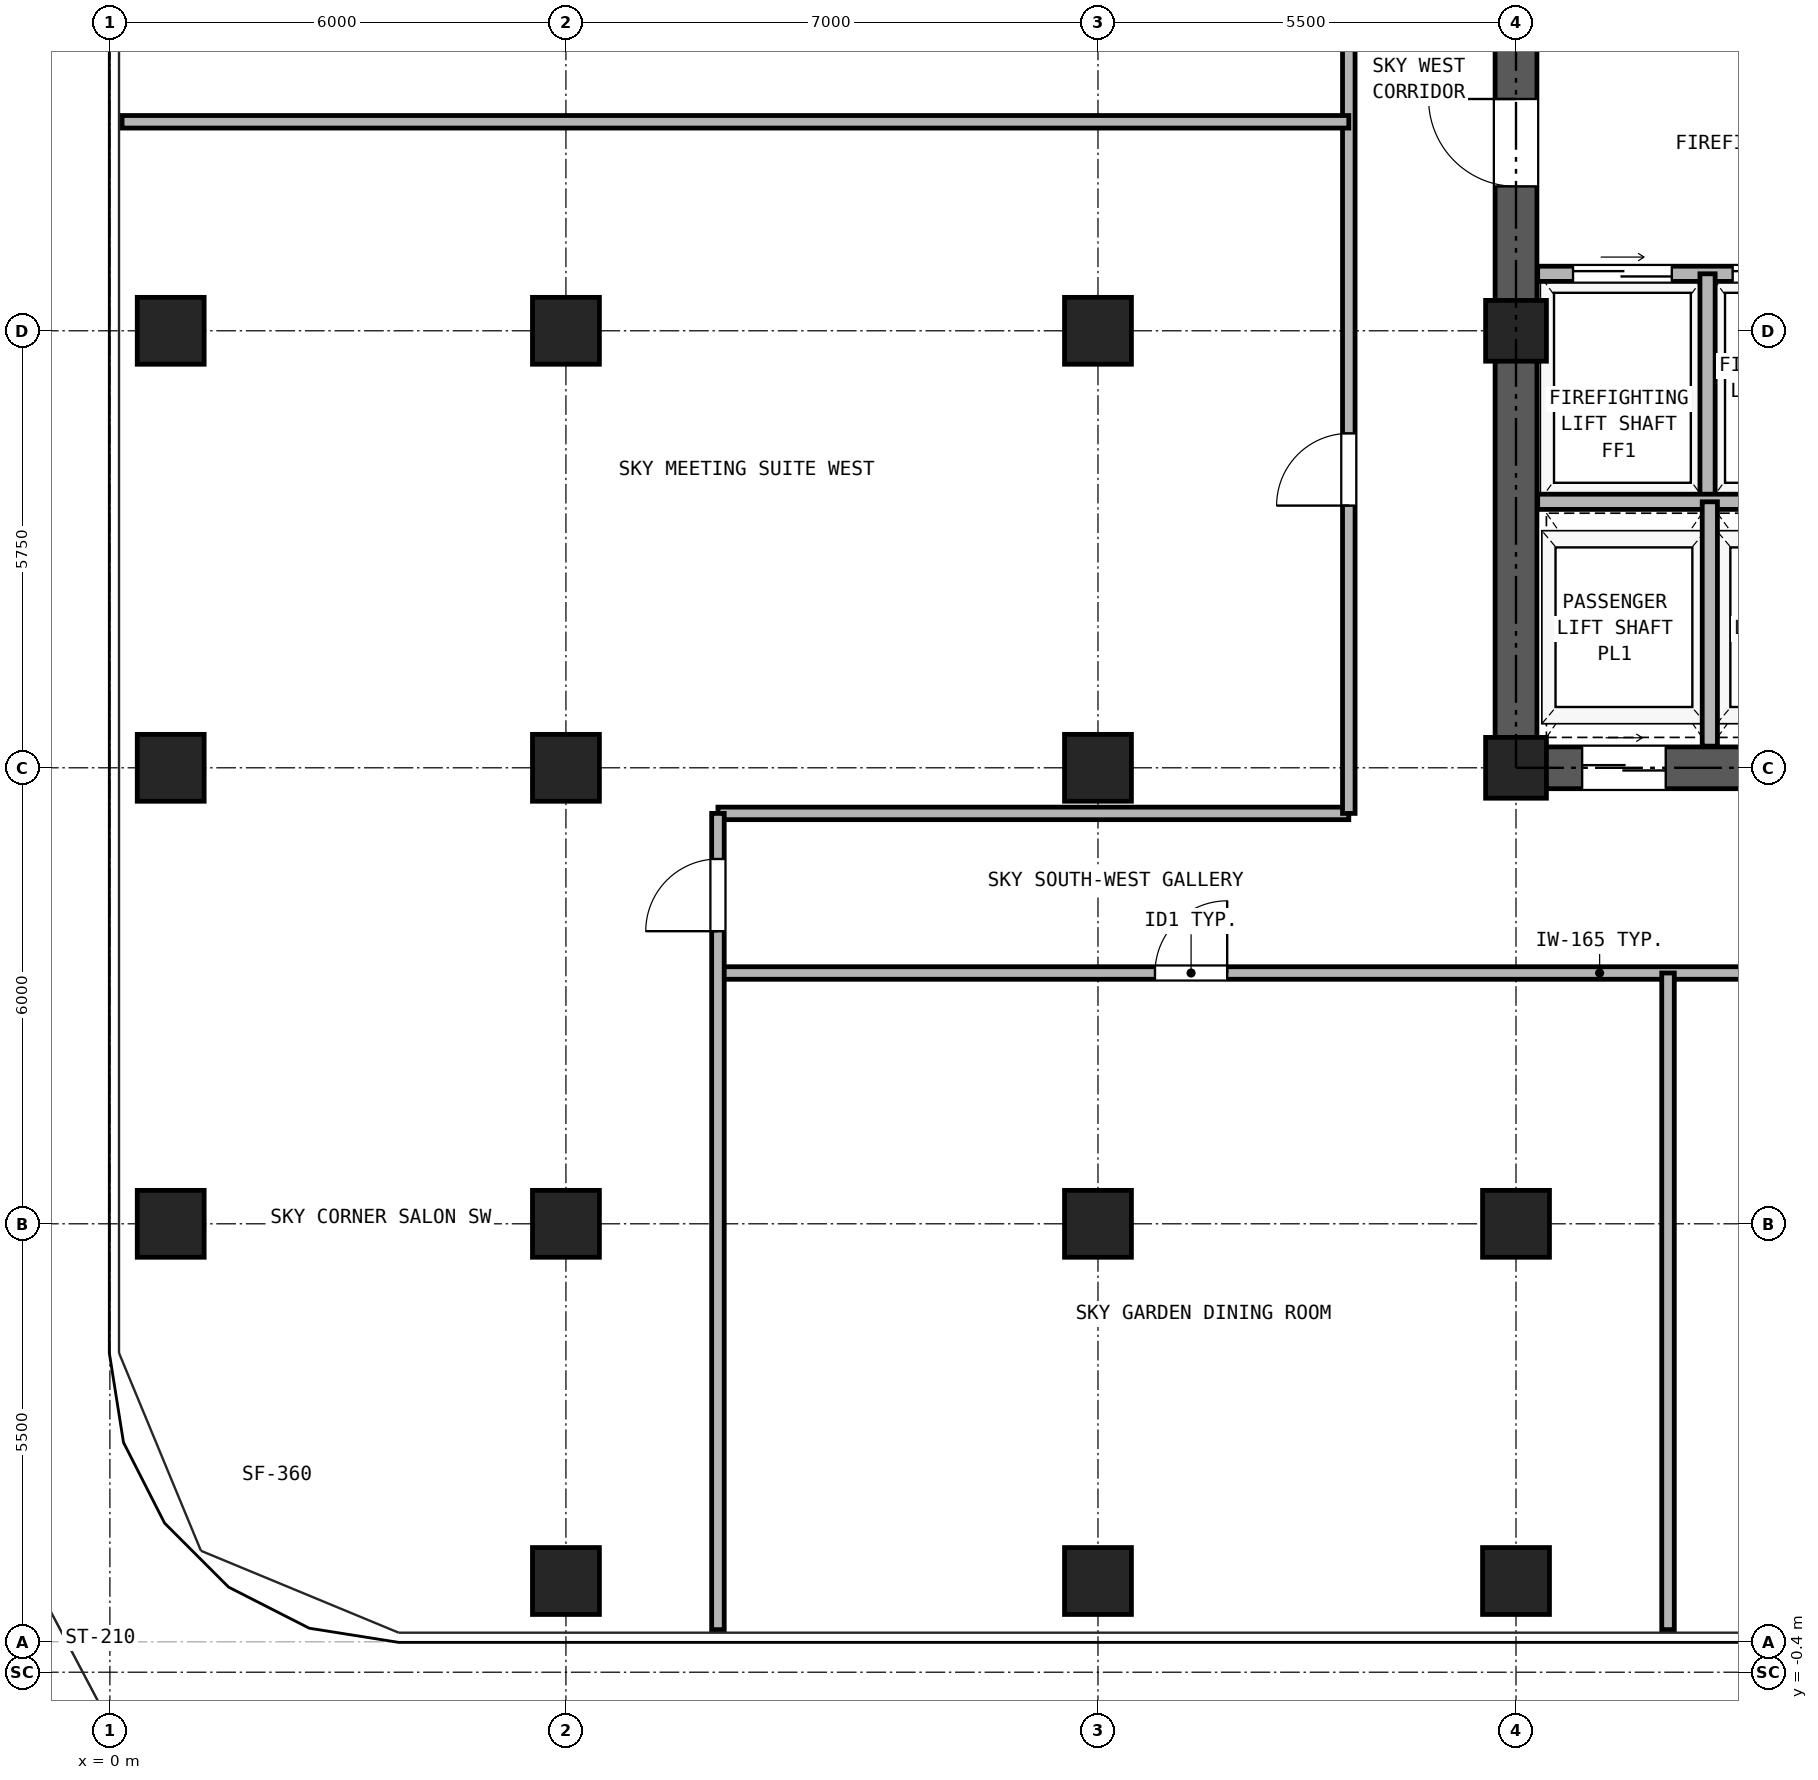
"""IFC4 building model, lengths in metres.
Left out: names, types, materials, properties, quantities, classifications, styles, units other than length and angle.
Written with IfcOpenShell. Run it as: python <this file> out.ifc"""

import sys

from ifc_helpers import new_model, si_unit, direction, frame, frame_2d, origin, origin_2d, place, context, subcontext, project, spatial, rectangle, hollow_rectangle, extrude, source, transform, mapped, element, fill, save


model = new_model("IFC4")
c1 = context("Model", 3, precision=1e-05, world=origin(), true_north=direction((0.0, 1.0)))
c2 = subcontext(c1, "Body", "Model", "MODEL_VIEW")
j1 = project(units=[si_unit("LENGTHUNIT", "METRE"), si_unit("PLANEANGLEUNIT", "RADIAN")], contexts=[c1])
p1 = place(None, origin())
s1 = spatial("IfcSite", under=j1, at=p1, CompositionType="ELEMENT")
p2 = place(p1, origin())
s2 = spatial("IfcBuilding", under=s1, at=p2, CompositionType="ELEMENT")
p3 = place(p2, frame((0.0, 0.0, 88.2)))
s3 = spatial("IfcBuildingStorey", under=s2, at=p3, CompositionType="ELEMENT", Elevation=88.2)
m1 = source(origin(), c2, "Body", "SweptSolid", [
    extrude(hollow_rectangle(XDim=0.88, YDim=0.88, WallThickness=0.05, at=origin_2d()), origin(), (0.0, 0.0, 1.0), 4.25),
])
for number, where, z_axis, x_axis in (
    (1, (6.0, 0.8, 0.0), (0.0, 0.0, 1.0), (1.0, 0.0, 0.0)),
    (2, (13.0, 0.8, 0.0), (0.0, 0.0, 1.0), (1.0, 0.0, 0.0)),
    (3, (18.5, 0.8, 0.0), (0.0, 0.0, 1.0), (1.0, 0.0, 0.0)),
    (4, (0.8, 5.5, 0.0), (0.0, 0.0, 1.0), (1.0, 0.0, 0.0)),
    (5, (0.8, 11.5, 0.0), (0.0, 0.0, 1.0), (1.0, 0.0, 0.0)),
    (6, (0.8, 17.25, 0.0), (0.0, 0.0, 1.0), (1.0, 0.0, 0.0)),
    (7, (6.0, 5.5, 0.0), (0.0, 0.0, 1.0), (1.0, 0.0, 0.0)),
    (8, (6.0, 11.5, 0.0), (0.0, 0.0, 1.0), (1.0, 0.0, 0.0)),
    (9, (6.0, 17.25, 0.0), (0.0, 0.0, 1.0), (1.0, 0.0, 0.0)),
    (10, (13.0, 5.5, 0.0), (0.0, 0.0, 1.0), (1.0, 0.0, 0.0)),
    (11, (13.0, 11.5, 0.0), (0.0, 0.0, 1.0), (1.0, 0.0, 0.0)),
    (12, (13.0, 17.25, 0.0), (0.0, 0.0, 1.0), (1.0, 0.0, 0.0)),
    (13, (18.5, 5.5, 0.0), (0.0, 0.0, 1.0), (1.0, 0.0, 0.0)),
):
    element("IfcColumn", number, at=place(p3, frame(where, z_axis=z_axis, x_axis=x_axis)), inside=s3, PredefinedType="COLUMN", context=c2, shape_type="MappedRepresentation", body=[
        mapped(m1, transform((0.0, 0.0, 0.0), x_axis=(1.0, 0.0, 0.0), y_axis=(0.0, 1.0, 0.0), z_axis=(0.0, 0.0, 1.0), scale=1.0)),
    ])
m2 = source(origin(), c2, "Body", "SweptSolid", [
    extrude(hollow_rectangle(XDim=0.8, YDim=0.8, WallThickness=0.045, at=origin_2d()), origin(), (0.0, 0.0, 1.0), 4.25),
])
for number, where, z_axis, x_axis in (
    (14, (18.5, 11.5, 0.0), (0.0, 0.0, 1.0), (1.0, 0.0, 0.0)),
    (15, (18.5, 17.25, 0.0), (0.0, 0.0, 1.0), (1.0, 0.0, 0.0)),
):
    element("IfcColumn", number, at=place(p3, frame(where, z_axis=z_axis, x_axis=x_axis)), inside=s3, PredefinedType="COLUMN", context=c2, shape_type="MappedRepresentation", body=[
        mapped(m2, transform((0.0, 0.0, 0.0), x_axis=(1.0, 0.0, 0.0), y_axis=(0.0, 1.0, 0.0), z_axis=(0.0, 0.0, 1.0), scale=1.0)),
    ])
p4 = place(p3, frame((18.225, 11.5, 0.0), z_axis=(0.0, 0.0, 1.0), x_axis=(1.0, 0.0, 0.0)))
e16 = element("IfcWall", 16, at=p4, inside=s3, PredefinedType="SHEAR", context=c2, shape_type="SweptSolid", body=[
    extrude(rectangle(XDim=10.55, YDim=0.55, at=frame_2d((5.275, 0.0))), origin(), (0.0, 0.0, 1.0), 4.25),
])
p5 = place(p4, frame((1.145, 0.0, 0.0)))
e17 = element("IfcOpeningElement", 17, at=p5, cuts=e16, PredefinedType="OPENING", context=c2, shape_type="SweptSolid", body=[
    extrude(rectangle(XDim=1.1, YDim=2.25, at=frame_2d((0.55, 1.125))), frame((0.0, 0.285, 0.0), z_axis=(0.0, -1.0, 0.0), x_axis=(1.0, 0.0, 0.0)), (0.0, 0.0, 1.0), 0.57),
])
p6 = place(p4, frame((3.445, 0.0, 0.0)))
e18 = element("IfcOpeningElement", 18, at=p6, cuts=e16, PredefinedType="OPENING", context=c2, shape_type="SweptSolid", body=[
    extrude(rectangle(XDim=1.1, YDim=2.25, at=frame_2d((0.55, 1.125))), frame((0.0, 0.285, 0.0), z_axis=(0.0, -1.0, 0.0), x_axis=(1.0, 0.0, 0.0)), (0.0, 0.0, 1.0), 0.57),
])
p7 = place(p4, frame((5.875, 0.0, 0.0)))
e19 = element("IfcOpeningElement", 19, at=p7, cuts=e16, PredefinedType="OPENING", context=c2, shape_type="SweptSolid", body=[
    extrude(rectangle(XDim=1.1, YDim=2.25, at=frame_2d((0.55, 1.125))), frame((0.0, 0.285, 0.0), z_axis=(0.0, -1.0, 0.0), x_axis=(1.0, 0.0, 0.0)), (0.0, 0.0, 1.0), 0.57),
])
p8 = place(p4, frame((8.275, 0.0, 0.0)))
e20 = element("IfcOpeningElement", 20, at=p8, cuts=e16, PredefinedType="OPENING", context=c2, shape_type="SweptSolid", body=[
    extrude(rectangle(XDim=1.1, YDim=2.25, at=frame_2d((0.55, 1.125))), frame((0.0, 0.285, 0.0), z_axis=(0.0, -1.0, 0.0), x_axis=(1.0, 0.0, 0.0)), (0.0, 0.0, 1.0), 0.57),
])
p9 = place(p3, frame((18.5, 11.775, 0.0), z_axis=(0.0, 0.0, 1.0), x_axis=(0.0, 1.0, 0.0)))
e21 = element("IfcWall", 21, at=p9, inside=s3, PredefinedType="SHEAR", context=c2, shape_type="SweptSolid", body=[
    extrude(rectangle(XDim=16.7, YDim=0.55, at=frame_2d((8.35, 0.0))), origin(), (0.0, 0.0, 1.0), 4.25),
])
p10 = place(p9, frame((7.375, 0.0, 0.0)))
e22 = element("IfcOpeningElement", 22, at=p10, cuts=e21, PredefinedType="OPENING", context=c2, shape_type="SweptSolid", body=[
    extrude(rectangle(XDim=1.15, YDim=2.2, at=frame_2d((0.575, 1.1))), frame((0.0, 0.285, 0.0), z_axis=(0.0, -1.0, 0.0), x_axis=(1.0, 0.0, 0.0)), (0.0, 0.0, 1.0), 0.57),
])
p11 = place(p3, frame((18.785, 18.0, 0.0), z_axis=(0.0, 0.0, 1.0), x_axis=(1.0, 0.0, 0.0)))
e23 = element("IfcWall", 23, at=p11, inside=s3, PredefinedType="PARTITIONING", context=c2, shape_type="SweptSolid", body=[
    extrude(rectangle(XDim=9.43, YDim=0.2, at=frame_2d((4.715, 0.0))), origin(), (0.0, 0.0, 1.0), 4.25),
])
p12 = place(p11, frame((0.465, 0.0, 0.0)))
e24 = element("IfcOpeningElement", 24, at=p12, cuts=e23, PredefinedType="OPENING", context=c2, shape_type="SweptSolid", body=[
    extrude(rectangle(XDim=1.3, YDim=2.3, at=frame_2d((0.65, 1.15))), frame((0.0, 0.11, 0.0), z_axis=(0.0, -1.0, 0.0), x_axis=(1.0, 0.0, 0.0)), (0.0, 0.0, 1.0), 0.22),
])
p13 = place(p11, frame((2.565, 0.0, 0.0)))
e25 = element("IfcOpeningElement", 25, at=p13, cuts=e23, PredefinedType="OPENING", context=c2, shape_type="SweptSolid", body=[
    extrude(rectangle(XDim=1.3, YDim=2.3, at=frame_2d((0.65, 1.15))), frame((0.0, 0.11, 0.0), z_axis=(0.0, -1.0, 0.0), x_axis=(1.0, 0.0, 0.0)), (0.0, 0.0, 1.0), 0.22),
])
p14 = place(p11, frame((7.065, 0.0, 0.0)))
e26 = element("IfcOpeningElement", 26, at=p14, cuts=e23, PredefinedType="OPENING", context=c2, shape_type="SweptSolid", body=[
    extrude(rectangle(XDim=1.0, YDim=2.15, at=frame_2d((0.5, 1.075))), frame((0.0, 0.11, 0.0), z_axis=(0.0, -1.0, 0.0), x_axis=(1.0, 0.0, 0.0)), (0.0, 0.0, 1.0), 0.22),
])
p15 = place(p3, frame((21.02, 15.0, 0.0), z_axis=(0.0, 0.0, 1.0), x_axis=(0.0, 1.0, 0.0)))
e27 = element("IfcWall", 27, at=p15, inside=s3, PredefinedType="PARTITIONING", context=c2, shape_type="SweptSolid", body=[
    extrude(rectangle(XDim=3.0, YDim=0.2, at=frame_2d((1.5, 0.0))), origin(), (0.0, 0.0, 1.0), 4.25),
])
p16 = place(p3, frame((18.785, 15.0, 0.0), z_axis=(0.0, 0.0, 1.0), x_axis=(1.0, 0.0, 0.0)))
e28 = element("IfcWall", 28, at=p16, inside=s3, PredefinedType="PARTITIONING", context=c2, shape_type="SweptSolid", body=[
    extrude(rectangle(XDim=9.43, YDim=0.2, at=frame_2d((4.715, 0.0))), origin(), (0.0, 0.0, 1.0), 4.25),
])
p17 = place(p3, frame((21.05, 11.785, 0.0), z_axis=(0.0, 0.0, 1.0), x_axis=(0.0, 1.0, 0.0)))
e29 = element("IfcWall", 29, at=p17, inside=s3, PredefinedType="PARTITIONING", context=c2, shape_type="SweptSolid", body=[
    extrude(rectangle(XDim=3.215, YDim=0.2, at=frame_2d((1.607, 0.0))), origin(), (0.0, 0.0, 1.0), 4.25),
])
p18 = place(p3, frame((8.0, 8.8, 0.0), z_axis=(0.0, 0.0, 1.0), x_axis=(1.0, 0.0, 0.0)))
e30 = element("IfcWall", 30, at=p18, inside=s3, PredefinedType="PARTITIONING", context=c2, shape_type="SweptSolid", body=[
    extrude(rectangle(XDim=31.0, YDim=0.165, at=frame_2d((15.5, 0.0))), origin(), (0.0, 0.0, 1.0), 4.25),
])
p19 = place(p18, frame((5.75, 0.0, 0.0)))
e31 = element("IfcOpeningElement", 31, at=p19, cuts=e30, PredefinedType="OPENING", context=c2, shape_type="SweptSolid", body=[
    extrude(rectangle(XDim=0.95, YDim=2.15, at=frame_2d((0.475, 1.075))), frame((0.0, 0.093, 0.0), z_axis=(0.0, -1.0, 0.0), x_axis=(1.0, 0.0, 0.0)), (0.0, 0.0, 1.0), 0.185),
])
p20 = place(p18, frame((16.5, 0.0, 0.0)))
e32 = element("IfcOpeningElement", 32, at=p20, cuts=e30, PredefinedType="OPENING", context=c2, shape_type="SweptSolid", body=[
    extrude(rectangle(XDim=0.95, YDim=2.15, at=frame_2d((0.475, 1.075))), frame((0.0, 0.093, 0.0), z_axis=(0.0, -1.0, 0.0), x_axis=(1.0, 0.0, 0.0)), (0.0, 0.0, 1.0), 0.185),
])
p21 = place(p18, frame((23.15, 0.0, 0.0)))
e33 = element("IfcOpeningElement", 33, at=p21, cuts=e30, PredefinedType="OPENING", context=c2, shape_type="SweptSolid", body=[
    extrude(rectangle(XDim=0.95, YDim=2.15, at=frame_2d((0.475, 1.075))), frame((0.0, 0.093, 0.0), z_axis=(0.0, -1.0, 0.0), x_axis=(1.0, 0.0, 0.0)), (0.0, 0.0, 1.0), 0.185),
])
p22 = place(p18, frame((26.6, 0.0, 0.0)))
e34 = element("IfcOpeningElement", 34, at=p22, cuts=e30, PredefinedType="OPENING", context=c2, shape_type="SweptSolid", body=[
    extrude(rectangle(XDim=1.0, YDim=2.15, at=frame_2d((0.5, 1.075))), frame((0.0, 0.093, 0.0), z_axis=(0.0, -1.0, 0.0), x_axis=(1.0, 0.0, 0.0)), (0.0, 0.0, 1.0), 0.185),
])
p23 = place(p18, frame((29.2, 0.0, 0.0)))
e35 = element("IfcOpeningElement", 35, at=p23, cuts=e30, PredefinedType="OPENING", context=c2, shape_type="SweptSolid", body=[
    extrude(rectangle(XDim=0.92, YDim=2.1, at=frame_2d((0.46, 1.05))), frame((0.0, 0.093, 0.0), z_axis=(0.0, -1.0, 0.0), x_axis=(1.0, 0.0, 0.0)), (0.0, 0.0, 1.0), 0.185),
])
p24 = place(p3, frame((8.0, 10.9, 0.0), z_axis=(0.0, 0.0, 1.0), x_axis=(1.0, 0.0, 0.0)))
e36 = element("IfcWall", 36, at=p24, inside=s3, PredefinedType="PARTITIONING", context=c2, shape_type="SweptSolid", body=[
    extrude(rectangle(XDim=8.3, YDim=0.165, at=frame_2d((4.15, 0.0))), origin(), (0.0, 0.0, 1.0), 4.25),
])
p25 = place(p3, frame((16.3, 10.9, 0.0), z_axis=(0.0, 0.0, 1.0), x_axis=(0.0, 1.0, 0.0)))
e37 = element("IfcWall", 37, at=p25, inside=s3, PredefinedType="PARTITIONING", context=c2, shape_type="SweptSolid", body=[
    extrude(rectangle(XDim=18.35, YDim=0.165, at=frame_2d((9.175, 0.0))), origin(), (0.0, 0.0, 1.0), 4.25),
])
p26 = place(p25, frame((4.05, 0.0, 0.0)))
e38 = element("IfcOpeningElement", 38, at=p26, cuts=e37, PredefinedType="OPENING", context=c2, shape_type="SweptSolid", body=[
    extrude(rectangle(XDim=0.95, YDim=2.15, at=frame_2d((0.475, 1.075))), frame((0.0, 0.093, 0.0), z_axis=(0.0, -1.0, 0.0), x_axis=(1.0, 0.0, 0.0)), (0.0, 0.0, 1.0), 0.185),
])
p27 = place(p25, frame((13.225, 0.0, 0.0)))
e39 = element("IfcOpeningElement", 39, at=p27, cuts=e37, PredefinedType="OPENING", context=c2, shape_type="SweptSolid", body=[
    extrude(rectangle(XDim=0.95, YDim=2.15, at=frame_2d((0.475, 1.075))), frame((0.0, 0.093, 0.0), z_axis=(0.0, -1.0, 0.0), x_axis=(1.0, 0.0, 0.0)), (0.0, 0.0, 1.0), 0.185),
])
p28 = place(p3, frame((8.0, 0.16, 0.0), z_axis=(0.0, 0.0, 1.0), x_axis=(0.0, 1.0, 0.0)))
e40 = element("IfcWall", 40, at=p28, inside=s3, PredefinedType="PARTITIONING", context=c2, shape_type="SweptSolid", body=[
    extrude(rectangle(XDim=10.74, YDim=0.165, at=frame_2d((5.37, 0.0))), origin(), (0.0, 0.0, 1.0), 4.25),
])
p29 = place(p28, frame((9.19, 0.0, 0.0)))
e41 = element("IfcOpeningElement", 41, at=p29, cuts=e40, PredefinedType="OPENING", context=c2, shape_type="SweptSolid", body=[
    extrude(rectangle(XDim=0.95, YDim=2.15, at=frame_2d((0.475, 1.075))), frame((0.0, 0.093, 0.0), z_axis=(0.0, -1.0, 0.0), x_axis=(1.0, 0.0, 0.0)), (0.0, 0.0, 1.0), 0.185),
])
p30 = place(p3, frame((20.5, 0.16, 0.0), z_axis=(0.0, 0.0, 1.0), x_axis=(0.0, 1.0, 0.0)))
e42 = element("IfcWall", 42, at=p30, inside=s3, PredefinedType="PARTITIONING", context=c2, shape_type="SweptSolid", body=[
    extrude(rectangle(XDim=8.64, YDim=0.165, at=frame_2d((4.32, 0.0))), origin(), (0.0, 0.0, 1.0), 4.25),
])
p31 = place(p3, frame((0.16, 20.0, 0.0), z_axis=(0.0, 0.0, 1.0), x_axis=(1.0, 0.0, 0.0)))
e43 = element("IfcWall", 43, at=p31, inside=s3, PredefinedType="PARTITIONING", context=c2, shape_type="SweptSolid", body=[
    extrude(rectangle(XDim=16.14, YDim=0.165, at=frame_2d((8.07, 0.0))), origin(), (0.0, 0.0, 1.0), 3.883),
])
p32 = place(p12, origin())
e44 = element("IfcDoor", 44, at=p32, inside=s3, OperationType="DOUBLE_DOOR_SLIDING", PredefinedType="DOOR", context=c2, shape_type="SweptSolid", body=[
    extrude(rectangle(XDim=1.3, YDim=2.3, at=frame_2d((0.65, 1.15))), frame((0.0, 0.025, 0.0), z_axis=(0.0, -1.0, 0.0), x_axis=(1.0, 0.0, 0.0)), (0.0, 0.0, 1.0), 0.05),
])
fill(e24, e44)
p33 = place(p13, origin())
e45 = element("IfcDoor", 45, at=p33, inside=s3, OperationType="DOUBLE_DOOR_SLIDING", PredefinedType="DOOR", context=c2, shape_type="SweptSolid", body=[
    extrude(rectangle(XDim=1.3, YDim=2.3, at=frame_2d((0.65, 1.15))), frame((0.0, 0.025, 0.0), z_axis=(0.0, -1.0, 0.0), x_axis=(1.0, 0.0, 0.0)), (0.0, 0.0, 1.0), 0.05),
])
fill(e25, e45)
p34 = place(p10, frame((1.15, 0.0, 0.0), z_axis=(0.0, 0.0, 1.0), x_axis=(-1.0, 0.0, 0.0)))
e46 = element("IfcDoor", 46, at=p34, inside=s3, OperationType="SINGLE_SWING_RIGHT", PredefinedType="DOOR", context=c2, shape_type="SweptSolid", body=[
    extrude(rectangle(XDim=1.15, YDim=2.2, at=frame_2d((0.575, 1.1))), frame((0.0, 0.025, 0.0), z_axis=(0.0, -1.0, 0.0), x_axis=(1.0, 0.0, 0.0)), (0.0, 0.0, 1.0), 0.05),
])
fill(e22, e46)
p35 = place(p5, frame((1.1, 0.0, 0.0), z_axis=(0.0, 0.0, 1.0), x_axis=(-1.0, 0.0, 0.0)))
e47 = element("IfcDoor", 47, at=p35, inside=s3, OperationType="DOUBLE_DOOR_SLIDING", PredefinedType="DOOR", context=c2, shape_type="SweptSolid", body=[
    extrude(rectangle(XDim=1.1, YDim=2.25, at=frame_2d((0.55, 1.125))), frame((0.0, 0.025, 0.0), z_axis=(0.0, -1.0, 0.0), x_axis=(1.0, 0.0, 0.0)), (0.0, 0.0, 1.0), 0.05),
])
fill(e17, e47)
p36 = place(p19, frame((0.95, 0.0, 0.0), z_axis=(0.0, 0.0, 1.0), x_axis=(-1.0, 0.0, 0.0)))
e48 = element("IfcDoor", 48, at=p36, inside=s3, OperationType="SINGLE_SWING_RIGHT", PredefinedType="DOOR", context=c2, shape_type="SweptSolid", body=[
    extrude(rectangle(XDim=0.95, YDim=2.15, at=frame_2d((0.475, 1.075))), frame((0.0, 0.025, 0.0), z_axis=(0.0, -1.0, 0.0), x_axis=(1.0, 0.0, 0.0)), (0.0, 0.0, 1.0), 0.05),
])
fill(e31, e48)
p37 = place(p29, frame((0.95, 0.0, 0.0), z_axis=(0.0, 0.0, 1.0), x_axis=(-1.0, 0.0, 0.0)))
e49 = element("IfcDoor", 49, at=p37, inside=s3, OperationType="SINGLE_SWING_LEFT", PredefinedType="DOOR", context=c2, shape_type="SweptSolid", body=[
    extrude(rectangle(XDim=0.95, YDim=2.15, at=frame_2d((0.475, 1.075))), frame((0.0, 0.025, 0.0), z_axis=(0.0, -1.0, 0.0), x_axis=(1.0, 0.0, 0.0)), (0.0, 0.0, 1.0), 0.05),
])
fill(e41, e49)
p38 = place(p26, frame((0.95, 0.0, 0.0), z_axis=(0.0, 0.0, 1.0), x_axis=(-1.0, 0.0, 0.0)))
e50 = element("IfcDoor", 50, at=p38, inside=s3, OperationType="SINGLE_SWING_LEFT", PredefinedType="DOOR", context=c2, shape_type="SweptSolid", body=[
    extrude(rectangle(XDim=0.95, YDim=2.15, at=frame_2d((0.475, 1.075))), frame((0.0, 0.025, 0.0), z_axis=(0.0, -1.0, 0.0), x_axis=(1.0, 0.0, 0.0)), (0.0, 0.0, 1.0), 0.05),
])
fill(e38, e50)
save(model, sys.argv[1])
